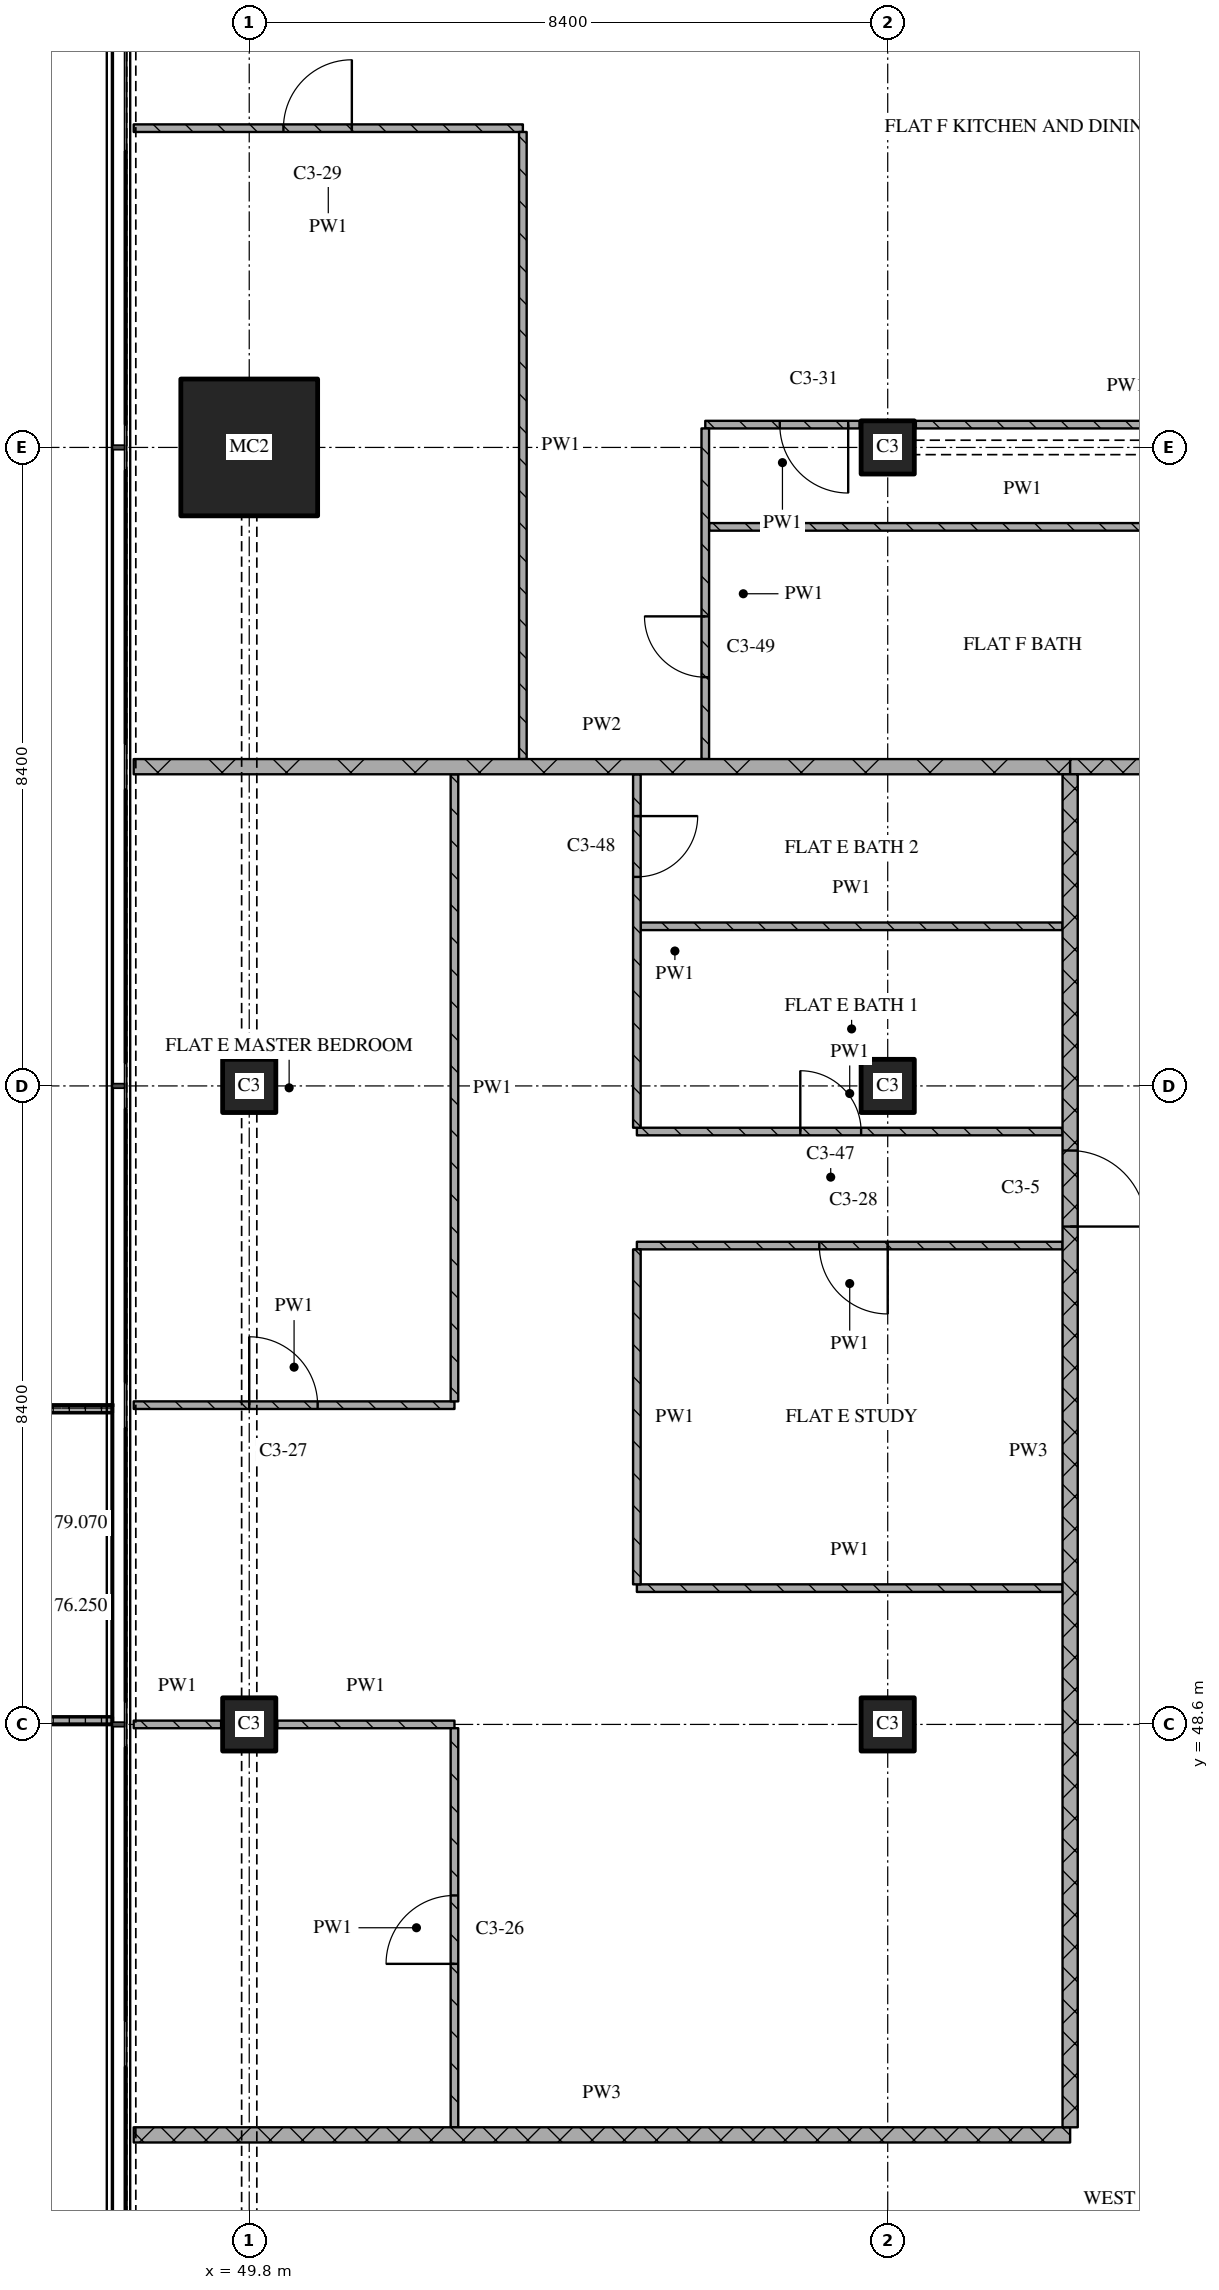
"""IFC4 building model, lengths in metres.
Left out: names, types, materials, properties, quantities, classifications, styles, units other than length and angle.
Written with IfcOpenShell. Run it as: python <this file> out.ifc"""

import sys

from ifc_helpers import new_model, si_unit, direction, frame, frame_2d, origin, origin_2d, place, context, subcontext, project, spatial, polyline, rectangle, outline, extrude, element, fill, save


model = new_model("IFC4")
c1 = context("Model", 3, precision=1e-05, world=origin(), true_north=direction((0.0, 1.0)))
c2 = subcontext(c1, "Body", "Model", "MODEL_VIEW")
j1 = project(units=[si_unit("LENGTHUNIT", "METRE"), si_unit("PLANEANGLEUNIT", "RADIAN")], contexts=[c1])
p1 = place(None, origin())
s1 = spatial("IfcSite", under=j1, at=p1, CompositionType="ELEMENT")
p2 = place(p1, origin())
s2 = spatial("IfcBuilding", under=s1, at=p2, CompositionType="ELEMENT")
p3 = place(p2, frame((0.0, 0.0, 176.25)))
s3 = spatial("IfcBuildingStorey", under=s2, at=p3, CompositionType="ELEMENT", Elevation=176.25)
for number, where, z_axis, x_axis in (
    (1, (49.8, 48.6, 0.0), (0.0, 0.0, 1.0), (1.0, 0.0, 0.0)),
    (2, (49.8, 57.0, 0.0), (0.0, 0.0, 1.0), (1.0, 0.0, 0.0)),
):
    element("IfcColumn", number, at=place(p3, frame(where, z_axis=z_axis, x_axis=x_axis)), inside=s3, PredefinedType="COLUMN", context=c2, shape_type="SweptSolid", body=[
        extrude(rectangle(XDim=0.7, YDim=0.7, at=origin_2d()), origin(), (0.0, 0.0, 1.0), 3.6),
    ])
p4 = place(p3, frame((49.8, 65.4, 0.0), z_axis=(0.0, 0.0, 1.0), x_axis=(1.0, 0.0, 0.0)))
e3 = element("IfcColumn", 3, at=p4, inside=s3, PredefinedType="COLUMN", context=c2, shape_type="SweptSolid", body=[
    extrude(rectangle(XDim=1.8, YDim=1.8, at=origin_2d()), origin(), (0.0, 0.0, 1.0), 3.6),
])
for number, where, z_axis, x_axis in (
    (4, (58.2, 48.6, 0.0), (0.0, 0.0, 1.0), (1.0, 0.0, 0.0)),
    (5, (58.2, 57.0, 0.0), (0.0, 0.0, 1.0), (1.0, 0.0, 0.0)),
    (6, (58.2, 65.4, 0.0), (0.0, 0.0, 1.0), (1.0, 0.0, 0.0)),
):
    element("IfcColumn", number, at=place(p3, frame(where, z_axis=z_axis, x_axis=x_axis)), inside=s3, PredefinedType="COLUMN", context=c2, shape_type="SweptSolid", body=[
        extrude(rectangle(XDim=0.7, YDim=0.7, at=origin_2d()), origin(), (0.0, 0.0, 1.0), 3.6),
    ])
p5 = place(p3, origin())
e7 = element("IfcWall", 7, at=p5, inside=s3, PredefinedType="SOLIDWALL", context=c2, shape_type="SweptSolid", body=[
    extrude(outline(polyline([(48.0, 52.8), (48.0, 52.7), (46.367, 52.7), (46.367, 48.7), (48.0, 48.7), (48.0, 48.6), (46.267, 48.6), (46.267, 52.8), (48.0, 52.8)])), origin(), (0.0, 0.0, 1.0), 1.0),
])
p6 = place(p3, frame((48.28, 43.2, 0.0), z_axis=(0.0, 0.0, 1.0), x_axis=(1.0, 0.0, 0.0)))
e8 = element("IfcWall", 8, at=p6, inside=s3, PredefinedType="PARTITIONING", context=c2, shape_type="SweptSolid", body=[
    extrude(rectangle(XDim=12.32, YDim=0.2, at=frame_2d((6.16, 0.0))), origin(), (0.0, 0.0, 1.0), 3.32),
])
p7 = place(p3, frame((48.28, 48.6, 0.0), z_axis=(0.0, 0.0, 1.0), x_axis=(1.0, 0.0, 0.0)))
e9 = element("IfcWall", 9, at=p7, inside=s3, PredefinedType="PARTITIONING", context=c2, shape_type="SweptSolid", body=[
    extrude(rectangle(XDim=1.15, YDim=0.1, at=frame_2d((0.575, 0.0))), origin(), (0.0, 0.0, 1.0), 3.32),
])
p8 = place(p3, frame((50.17, 48.6, 0.0), z_axis=(0.0, 0.0, 1.0), x_axis=(1.0, 0.0, 0.0)))
e10 = element("IfcWall", 10, at=p8, inside=s3, PredefinedType="PARTITIONING", context=c2, shape_type="SweptSolid", body=[
    extrude(rectangle(XDim=2.33, YDim=0.1, at=frame_2d((1.165, 0.0))), origin(), (0.0, 0.0, 1.0), 3.32),
])
p9 = place(p3, frame((54.9, 50.393, 0.0), z_axis=(0.0, 0.0, 1.0), x_axis=(1.0, 0.0, 0.0)))
e11 = element("IfcWall", 11, at=p9, inside=s3, PredefinedType="PARTITIONING", context=c2, shape_type="SweptSolid", body=[
    extrude(rectangle(XDim=5.6, YDim=0.1, at=frame_2d((2.8, 0.0))), origin(), (0.0, 0.0, 1.0), 3.32),
])
p10 = place(p3, frame((48.28, 52.8, 0.0), z_axis=(0.0, 0.0, 1.0), x_axis=(1.0, 0.0, 0.0)))
e12 = element("IfcWall", 12, at=p10, inside=s3, PredefinedType="PARTITIONING", context=c2, shape_type="SweptSolid", body=[
    extrude(rectangle(XDim=4.22, YDim=0.1, at=frame_2d((2.11, 0.0))), origin(), (0.0, 0.0, 1.0), 3.32),
])
p11 = place(p10, frame((1.52, 0.0, 0.0)))
e13 = element("IfcOpeningElement", 13, at=p11, cuts=e12, PredefinedType="OPENING", context=c2, shape_type="SweptSolid", body=[
    extrude(rectangle(XDim=0.9, YDim=2.1, at=frame_2d((0.45, 1.05))), frame((0.0, 0.06, 0.0), z_axis=(0.0, -1.0, 0.0), x_axis=(1.0, 0.0, 0.0)), (0.0, 0.0, 1.0), 0.12),
])
p12 = place(p3, frame((60.5, 54.9, 0.0), z_axis=(0.0, 0.0, 1.0), x_axis=(-1.0, 0.0, 0.0)))
e14 = element("IfcWall", 14, at=p12, inside=s3, PredefinedType="PARTITIONING", context=c2, shape_type="SweptSolid", body=[
    extrude(rectangle(XDim=5.6, YDim=0.1, at=frame_2d((2.8, 0.0))), origin(), (0.0, 0.0, 1.0), 3.32),
])
p13 = place(p12, frame((2.3, 0.0, 0.0)))
e15 = element("IfcOpeningElement", 15, at=p13, cuts=e14, PredefinedType="OPENING", context=c2, shape_type="SweptSolid", body=[
    extrude(rectangle(XDim=0.9, YDim=2.1, at=frame_2d((0.45, 1.05))), frame((0.0, 0.06, 0.0), z_axis=(0.0, -1.0, 0.0), x_axis=(1.0, 0.0, 0.0)), (0.0, 0.0, 1.0), 0.12),
])
p14 = place(p3, frame((54.9, 56.4, 0.0), z_axis=(0.0, 0.0, 1.0), x_axis=(1.0, 0.0, 0.0)))
e16 = element("IfcWall", 16, at=p14, inside=s3, PredefinedType="PARTITIONING", context=c2, shape_type="SweptSolid", body=[
    extrude(rectangle(XDim=5.6, YDim=0.1, at=frame_2d((2.8, 0.0))), origin(), (0.0, 0.0, 1.0), 3.32),
])
p15 = place(p14, frame((2.15, 0.0, 0.0)))
e17 = element("IfcOpeningElement", 17, at=p15, cuts=e16, PredefinedType="OPENING", context=c2, shape_type="SweptSolid", body=[
    extrude(rectangle(XDim=0.8, YDim=2.1, at=frame_2d((0.4, 1.05))), frame((0.0, 0.06, 0.0), z_axis=(0.0, -1.0, 0.0), x_axis=(1.0, 0.0, 0.0)), (0.0, 0.0, 1.0), 0.12),
])
p16 = place(p3, frame((54.95, 59.1, 0.0), z_axis=(0.0, 0.0, 1.0), x_axis=(1.0, 0.0, 0.0)))
e18 = element("IfcWall", 18, at=p16, inside=s3, PredefinedType="PARTITIONING", context=c2, shape_type="SweptSolid", body=[
    extrude(rectangle(XDim=5.55, YDim=0.1, at=frame_2d((2.775, 0.0))), origin(), (0.0, 0.0, 1.0), 3.32),
])
p17 = place(p3, frame((60.6, 61.2, 0.0), z_axis=(0.0, 0.0, 1.0), x_axis=(1.0, 0.0, 0.0)))
e19 = element("IfcWall", 19, at=p17, inside=s3, PredefinedType="PARTITIONING", context=c2, shape_type="SweptSolid", body=[
    extrude(rectangle(XDim=3.6, YDim=0.2, at=frame_2d((1.8, 0.0))), origin(), (0.0, 0.0, 1.0), 3.32),
])
p18 = place(p3, frame((48.28, 61.2, 0.0), z_axis=(0.0, 0.0, 1.0), x_axis=(1.0, 0.0, 0.0)))
e20 = element("IfcWall", 20, at=p18, inside=s3, PredefinedType="PARTITIONING", context=c2, shape_type="SweptSolid", body=[
    extrude(rectangle(XDim=12.32, YDim=0.2, at=frame_2d((6.16, 0.0))), origin(), (0.0, 0.0, 1.0), 3.32),
])
p19 = place(p3, frame((55.85, 64.355, 0.0), z_axis=(0.0, 0.0, 1.0), x_axis=(1.0, 0.0, 0.0)))
e21 = element("IfcWall", 21, at=p19, inside=s3, PredefinedType="PARTITIONING", context=c2, shape_type="SweptSolid", body=[
    extrude(rectangle(XDim=8.25, YDim=0.1, at=frame_2d((4.125, 0.0))), origin(), (0.0, 0.0, 1.0), 3.32),
])
p20 = place(p3, frame((57.83, 65.7, 0.0), z_axis=(0.0, 0.0, 1.0), x_axis=(-1.0, 0.0, 0.0)))
e22 = element("IfcWall", 22, at=p20, inside=s3, PredefinedType="PARTITIONING", context=c2, shape_type="SweptSolid", body=[
    extrude(rectangle(XDim=2.03, YDim=0.1, at=frame_2d((1.015, 0.0))), origin(), (0.0, 0.0, 1.0), 3.32),
])
p21 = place(p20, frame((0.15, 0.0, 0.0)))
e23 = element("IfcOpeningElement", 23, at=p21, cuts=e22, PredefinedType="OPENING", context=c2, shape_type="SweptSolid", body=[
    extrude(rectangle(XDim=0.9, YDim=2.1, at=frame_2d((0.45, 1.05))), frame((0.0, 0.06, 0.0), z_axis=(0.0, -1.0, 0.0), x_axis=(1.0, 0.0, 0.0)), (0.0, 0.0, 1.0), 0.12),
])
p22 = place(p3, frame((58.57, 65.7, 0.0), z_axis=(0.0, 0.0, 1.0), x_axis=(1.0, 0.0, 0.0)))
e24 = element("IfcWall", 24, at=p22, inside=s3, PredefinedType="PARTITIONING", context=c2, shape_type="SweptSolid", body=[
    extrude(rectangle(XDim=5.53, YDim=0.1, at=frame_2d((2.765, 0.0))), origin(), (0.0, 0.0, 1.0), 3.32),
])
p23 = place(p3, frame((53.4, 69.6, 0.0), z_axis=(0.0, 0.0, 1.0), x_axis=(-1.0, 0.0, 0.0)))
e25 = element("IfcWall", 25, at=p23, inside=s3, PredefinedType="PARTITIONING", context=c2, shape_type="SweptSolid", body=[
    extrude(rectangle(XDim=5.12, YDim=0.1, at=frame_2d((2.56, 0.0))), origin(), (0.0, 0.0, 1.0), 3.32),
])
p24 = place(p23, frame((2.25, 0.0, 0.0)))
e26 = element("IfcOpeningElement", 26, at=p24, cuts=e25, PredefinedType="OPENING", context=c2, shape_type="SweptSolid", body=[
    extrude(rectangle(XDim=0.9, YDim=2.1, at=frame_2d((0.45, 1.05))), frame((0.0, 0.06, 0.0), z_axis=(0.0, -1.0, 0.0), x_axis=(1.0, 0.0, 0.0)), (0.0, 0.0, 1.0), 0.12),
])
p25 = place(p3, frame((52.5, 43.3, 0.0), z_axis=(0.0, 0.0, 1.0), x_axis=(0.0, 1.0, 0.0)))
e27 = element("IfcWall", 27, at=p25, inside=s3, PredefinedType="PARTITIONING", context=c2, shape_type="SweptSolid", body=[
    extrude(rectangle(XDim=5.25, YDim=0.1, at=frame_2d((2.625, 0.0))), origin(), (0.0, 0.0, 1.0), 3.32),
])
p26 = place(p25, frame((2.15, 0.0, 0.0)))
e28 = element("IfcOpeningElement", 28, at=p26, cuts=e27, PredefinedType="OPENING", context=c2, shape_type="SweptSolid", body=[
    extrude(rectangle(XDim=0.9, YDim=2.1, at=frame_2d((0.45, 1.05))), frame((0.0, 0.06, 0.0), z_axis=(0.0, -1.0, 0.0), x_axis=(1.0, 0.0, 0.0)), (0.0, 0.0, 1.0), 0.12),
])
for number, where, z_axis, x_axis in (
    (29, (52.5, 61.1, 0.0), (0.0, 0.0, 1.0), (0.0, -1.0, 0.0)),
    (30, (53.4, 69.55, 0.0), (0.0, 0.0, 1.0), (0.0, -1.0, 0.0)),
):
    element("IfcWall", number, at=place(p3, frame(where, z_axis=z_axis, x_axis=x_axis)), inside=s3, PredefinedType="PARTITIONING", context=c2, shape_type="SweptSolid", body=[
        extrude(rectangle(XDim=8.25, YDim=0.1, at=frame_2d((4.125, 0.0))), origin(), (0.0, 0.0, 1.0), 3.32),
    ])
p27 = place(p3, frame((54.9, 54.85, 0.0), z_axis=(0.0, 0.0, 1.0), x_axis=(0.0, -1.0, 0.0)))
e31 = element("IfcWall", 31, at=p27, inside=s3, PredefinedType="PARTITIONING", context=c2, shape_type="SweptSolid", body=[
    extrude(rectangle(XDim=4.407, YDim=0.1, at=frame_2d((2.204, 0.0))), origin(), (0.0, 0.0, 1.0), 3.32),
])
p28 = place(p3, frame((54.9, 61.1, 0.0), z_axis=(0.0, 0.0, 1.0), x_axis=(0.0, -1.0, 0.0)))
e32 = element("IfcWall", 32, at=p28, inside=s3, PredefinedType="PARTITIONING", context=c2, shape_type="SweptSolid", body=[
    extrude(rectangle(XDim=4.65, YDim=0.1, at=frame_2d((2.325, 0.0))), origin(), (0.0, 0.0, 1.0), 3.32),
])
p29 = place(p28, frame((0.55, 0.0, 0.0)))
e33 = element("IfcOpeningElement", 33, at=p29, cuts=e32, PredefinedType="OPENING", context=c2, shape_type="SweptSolid", body=[
    extrude(rectangle(XDim=0.8, YDim=2.1, at=frame_2d((0.4, 1.05))), frame((0.0, 0.06, 0.0), z_axis=(0.0, -1.0, 0.0), x_axis=(1.0, 0.0, 0.0)), (0.0, 0.0, 1.0), 0.12),
])
p30 = place(p3, frame((55.8, 65.65, 0.0), z_axis=(0.0, 0.0, 1.0), x_axis=(0.0, -1.0, 0.0)))
e34 = element("IfcWall", 34, at=p30, inside=s3, PredefinedType="PARTITIONING", context=c2, shape_type="SweptSolid", body=[
    extrude(rectangle(XDim=4.35, YDim=0.1, at=frame_2d((2.175, 0.0))), origin(), (0.0, 0.0, 1.0), 3.32),
])
p31 = place(p30, frame((2.473, 0.0, 0.0)))
e35 = element("IfcOpeningElement", 35, at=p31, cuts=e34, PredefinedType="OPENING", context=c2, shape_type="SweptSolid", body=[
    extrude(rectangle(XDim=0.8, YDim=2.1, at=frame_2d((0.4, 1.05))), frame((0.0, 0.06, 0.0), z_axis=(0.0, -1.0, 0.0), x_axis=(1.0, 0.0, 0.0)), (0.0, 0.0, 1.0), 0.12),
])
p32 = place(p3, frame((60.6, 43.3, 0.0), z_axis=(0.0, 0.0, 1.0), x_axis=(0.0, 1.0, 0.0)))
e36 = element("IfcWall", 36, at=p32, inside=s3, PredefinedType="PARTITIONING", context=c2, shape_type="SweptSolid", body=[
    extrude(rectangle(XDim=17.8, YDim=0.2, at=frame_2d((8.9, 0.0))), origin(), (0.0, 0.0, 1.0), 3.32),
])
p33 = place(p32, frame((11.85, 0.0, 0.0)))
e37 = element("IfcOpeningElement", 37, at=p33, cuts=e36, PredefinedType="OPENING", context=c2, shape_type="SweptSolid", body=[
    extrude(rectangle(XDim=1.0, YDim=2.1, at=frame_2d((0.5, 1.05))), frame((0.0, 0.11, 0.0), z_axis=(0.0, -1.0, 0.0), x_axis=(1.0, 0.0, 0.0)), (0.0, 0.0, 1.0), 0.22),
])
p34 = place(p11, origin())
e38 = element("IfcDoor", 38, at=p34, inside=s3, OperationType="SINGLE_SWING_LEFT", PredefinedType="DOOR", context=c2, shape_type="SweptSolid", body=[
    extrude(rectangle(XDim=0.9, YDim=2.1, at=frame_2d((0.45, 1.05))), frame((0.0, 0.025, 0.0), z_axis=(0.0, -1.0, 0.0), x_axis=(1.0, 0.0, 0.0)), (0.0, 0.0, 1.0), 0.05),
])
fill(e13, e38)
p35 = place(p13, origin())
e39 = element("IfcDoor", 39, at=p35, inside=s3, OperationType="SINGLE_SWING_LEFT", PredefinedType="DOOR", context=c2, shape_type="SweptSolid", body=[
    extrude(rectangle(XDim=0.9, YDim=2.1, at=frame_2d((0.45, 1.05))), frame((0.0, 0.025, 0.0), z_axis=(0.0, -1.0, 0.0), x_axis=(1.0, 0.0, 0.0)), (0.0, 0.0, 1.0), 0.05),
])
fill(e15, e39)
p36 = place(p15, origin())
e40 = element("IfcDoor", 40, at=p36, inside=s3, OperationType="SINGLE_SWING_LEFT", PredefinedType="DOOR", context=c2, shape_type="SweptSolid", body=[
    extrude(rectangle(XDim=0.8, YDim=2.1, at=frame_2d((0.4, 1.05))), frame((0.0, 0.025, 0.0), z_axis=(0.0, -1.0, 0.0), x_axis=(1.0, 0.0, 0.0)), (0.0, 0.0, 1.0), 0.05),
])
fill(e17, e40)
p37 = place(p21, origin())
e41 = element("IfcDoor", 41, at=p37, inside=s3, OperationType="SINGLE_SWING_LEFT", PredefinedType="DOOR", context=c2, shape_type="SweptSolid", body=[
    extrude(rectangle(XDim=0.9, YDim=2.1, at=frame_2d((0.45, 1.05))), frame((0.0, 0.025, 0.0), z_axis=(0.0, -1.0, 0.0), x_axis=(1.0, 0.0, 0.0)), (0.0, 0.0, 1.0), 0.05),
])
fill(e23, e41)
p38 = place(p24, origin())
e42 = element("IfcDoor", 42, at=p38, inside=s3, OperationType="SINGLE_SWING_RIGHT", PredefinedType="DOOR", context=c2, shape_type="SweptSolid", body=[
    extrude(rectangle(XDim=0.9, YDim=2.1, at=frame_2d((0.45, 1.05))), frame((0.0, 0.025, 0.0), z_axis=(0.0, -1.0, 0.0), x_axis=(1.0, 0.0, 0.0)), (0.0, 0.0, 1.0), 0.05),
])
fill(e26, e42)
p39 = place(p26, origin())
e43 = element("IfcDoor", 43, at=p39, inside=s3, OperationType="SINGLE_SWING_LEFT", PredefinedType="DOOR", context=c2, shape_type="SweptSolid", body=[
    extrude(rectangle(XDim=0.9, YDim=2.1, at=frame_2d((0.45, 1.05))), frame((0.0, 0.025, 0.0), z_axis=(0.0, -1.0, 0.0), x_axis=(1.0, 0.0, 0.0)), (0.0, 0.0, 1.0), 0.05),
])
fill(e28, e43)
p40 = place(p29, origin())
e44 = element("IfcDoor", 44, at=p40, inside=s3, OperationType="SINGLE_SWING_LEFT", PredefinedType="DOOR", context=c2, shape_type="SweptSolid", body=[
    extrude(rectangle(XDim=0.8, YDim=2.1, at=frame_2d((0.4, 1.05))), frame((0.0, 0.025, 0.0), z_axis=(0.0, -1.0, 0.0), x_axis=(1.0, 0.0, 0.0)), (0.0, 0.0, 1.0), 0.05),
])
fill(e33, e44)
p41 = place(p31, origin())
e45 = element("IfcDoor", 45, at=p41, inside=s3, OperationType="SINGLE_SWING_RIGHT", PredefinedType="DOOR", context=c2, shape_type="SweptSolid", body=[
    extrude(rectangle(XDim=0.8, YDim=2.1, at=frame_2d((0.4, 1.05))), frame((0.0, 0.025, 0.0), z_axis=(0.0, -1.0, 0.0), x_axis=(1.0, 0.0, 0.0)), (0.0, 0.0, 1.0), 0.05),
])
fill(e35, e45)
p42 = place(p33, origin())
e46 = element("IfcDoor", 46, at=p42, inside=s3, OperationType="SINGLE_SWING_RIGHT", PredefinedType="DOOR", context=c2, shape_type="SweptSolid", body=[
    extrude(rectangle(XDim=1.0, YDim=2.1, at=frame_2d((0.5, 1.05))), frame((0.0, 0.025, 0.0), z_axis=(0.0, -1.0, 0.0), x_axis=(1.0, 0.0, 0.0)), (0.0, 0.0, 1.0), 0.05),
])
fill(e37, e46)
save(model, sys.argv[1])
